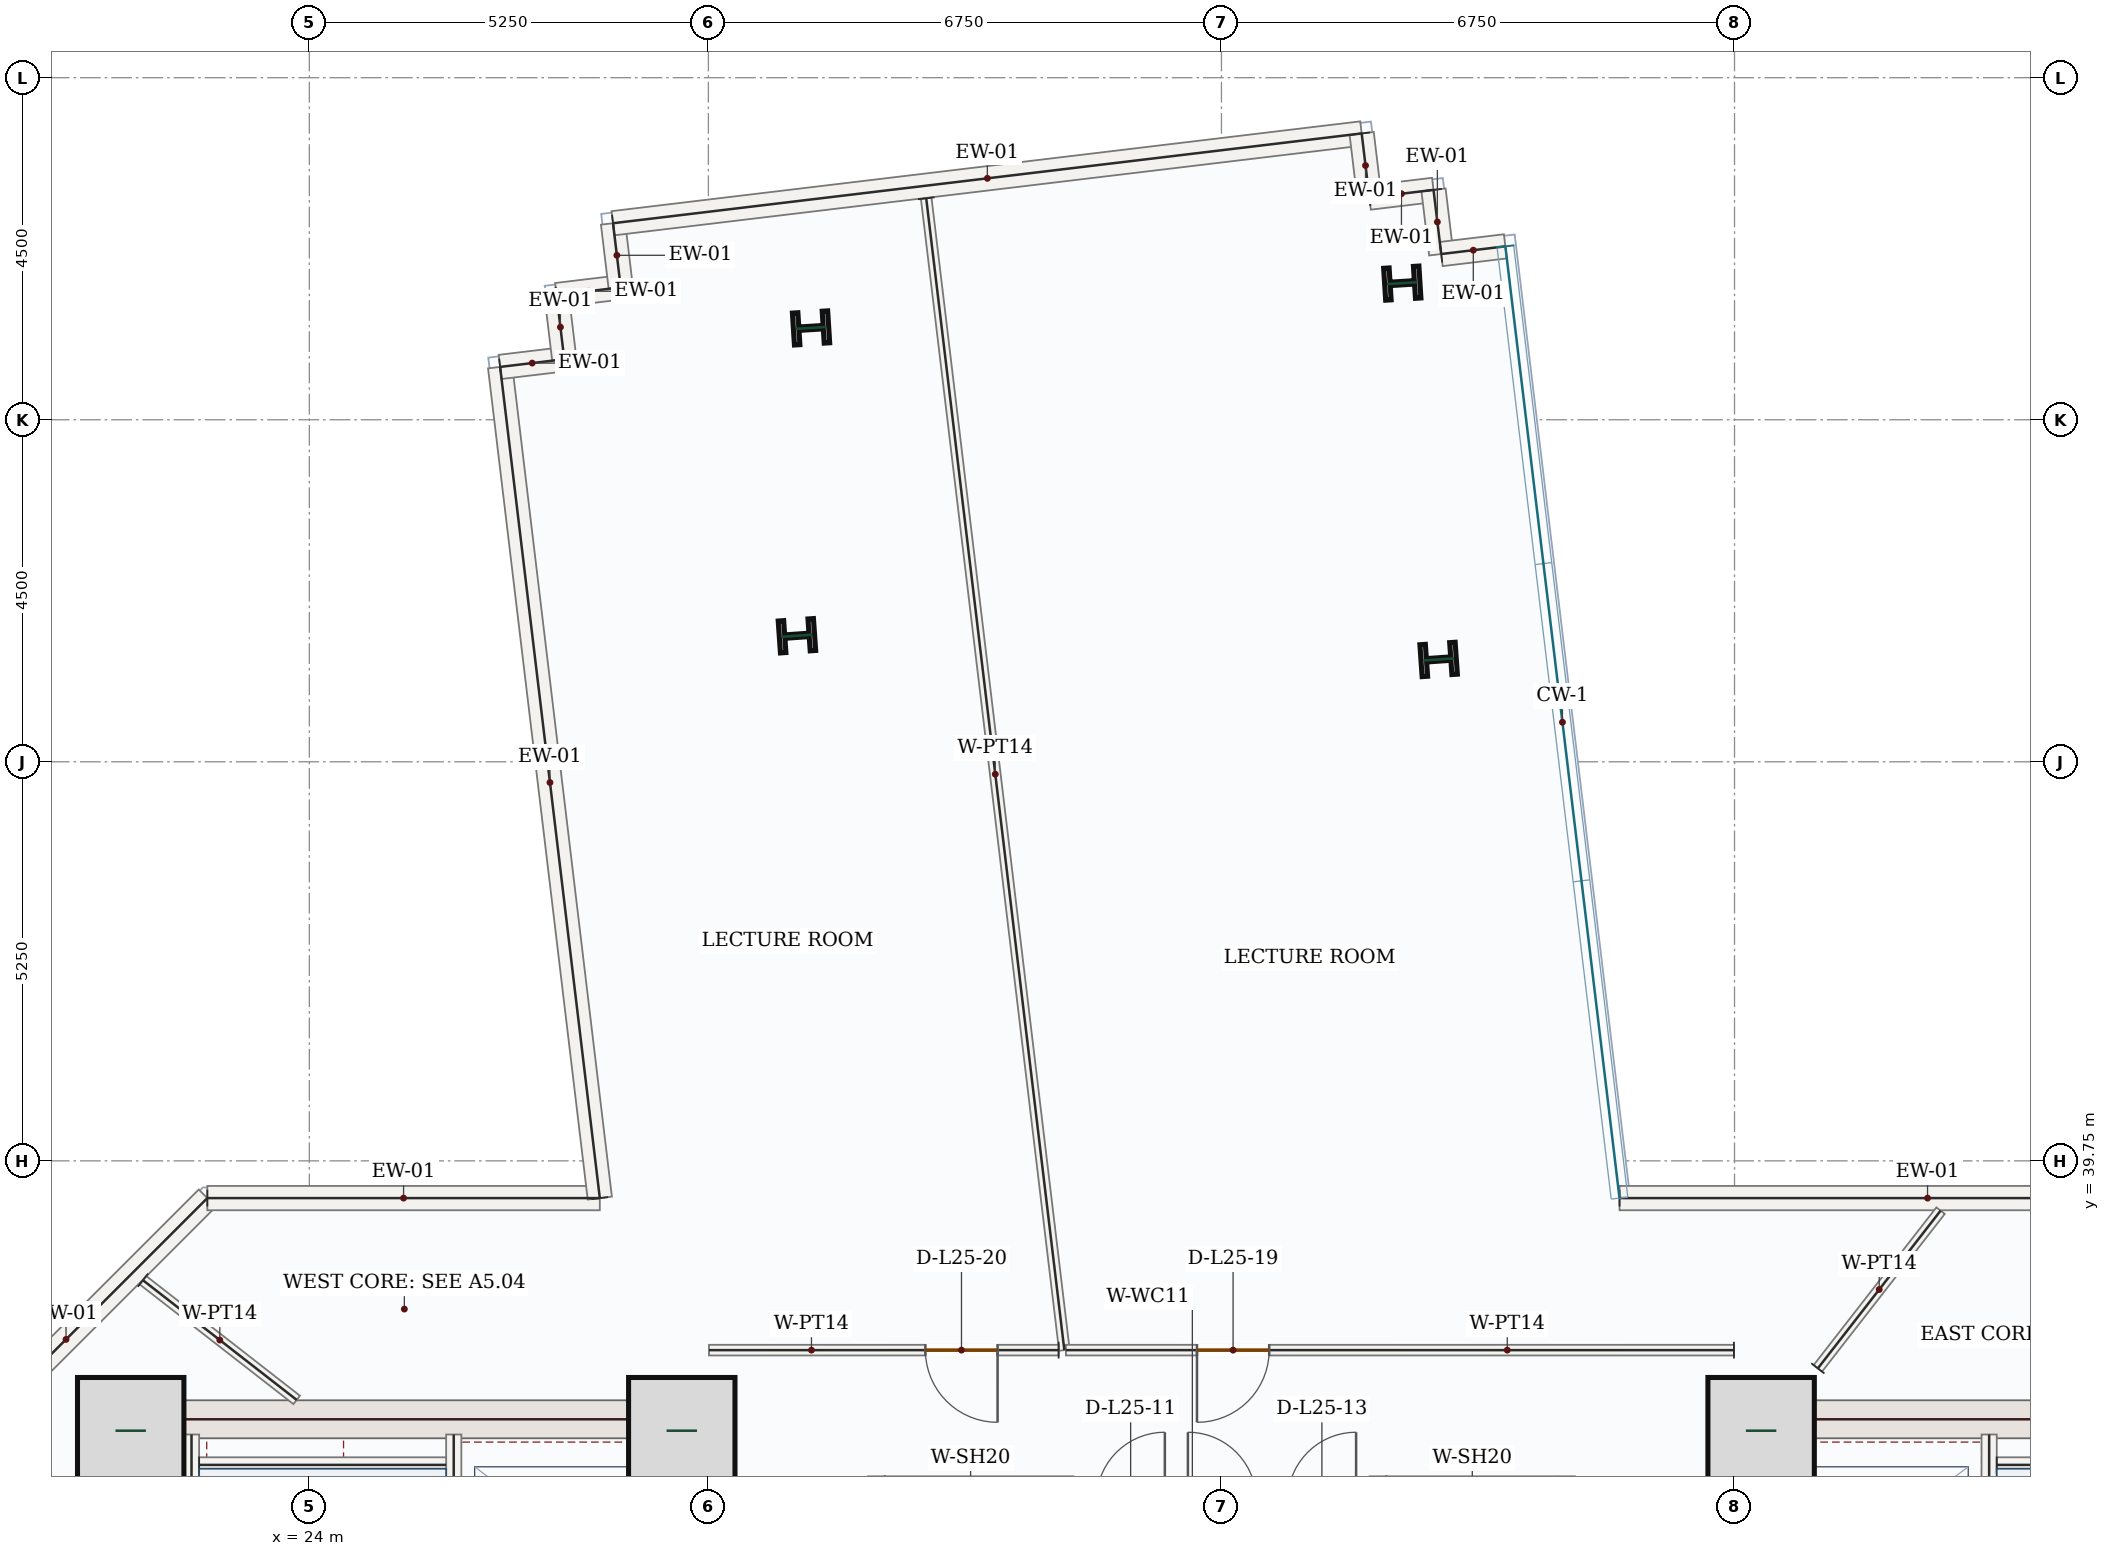
"""IFC4 building model, lengths in metres.
Left out: names, types, materials, properties, quantities, classifications, styles, units other than length and angle.
Written with IfcOpenShell. Run it as: python <this file> out.ifc"""

import sys

from ifc_helpers import new_model, si_unit, direction, frame, frame_2d, origin, origin_2d, place, context, subcontext, project, spatial, rectangle, i_section, extrude, source, transform, mapped, element, fill, save


model = new_model("IFC4")
c1 = context("Model", 3, precision=1e-05, world=origin(), true_north=direction((0.0, 1.0)))
c2 = subcontext(c1, "Body", "Model", "MODEL_VIEW")
j1 = project(units=[si_unit("LENGTHUNIT", "METRE"), si_unit("PLANEANGLEUNIT", "RADIAN")], contexts=[c1])
p1 = place(None, origin())
s1 = spatial("IfcSite", under=j1, at=p1, CompositionType="ELEMENT")
p2 = place(p1, origin())
s2 = spatial("IfcBuilding", under=s1, at=p2, CompositionType="ELEMENT")
p3 = place(p2, frame((0.0, 0.0, 113.1)))
s3 = spatial("IfcBuildingStorey", under=s2, at=p3, CompositionType="ELEMENT", Elevation=113.1)
m1 = source(origin(), c2, "Body", "SweptSolid", [
    extrude(rectangle(XDim=8.55, YDim=0.5, at=frame_2d((4.275, 0.0))), origin(), (0.0, 0.0, 1.0), 3.95),
])
p4 = place(p3, frame((21.5, 28.05, 0.0), z_axis=(0.0, 0.0, 1.0), x_axis=(0.0, 1.0, 0.0)))
e1 = element("IfcWall", 1, at=p4, inside=s3, PredefinedType="SHEAR", context=c2, shape_type="MappedRepresentation", body=[
    mapped(m1, transform((0.0, 0.0, 0.0), x_axis=(1.0, 0.0, 0.0), y_axis=(0.0, 1.0, 0.0), z_axis=(0.0, 0.0, 1.0), scale=1.0)),
])
p5 = place(p3, frame((29.0, 28.05, 0.0), z_axis=(0.0, 0.0, 1.0), x_axis=(0.0, 1.0, 0.0)))
e2 = element("IfcWall", 2, at=p5, inside=s3, PredefinedType="SHEAR", context=c2, shape_type="SweptSolid", body=[
    extrude(rectangle(XDim=8.55, YDim=0.5, at=frame_2d((4.275, 0.0))), origin(), (0.0, 0.0, 1.0), 3.95),
])
p6 = place(p5, frame((1.5, 0.0, 0.0)))
e3 = element("IfcOpeningElement", 3, at=p6, cuts=e2, PredefinedType="OPENING", context=c2, shape_type="SweptSolid", body=[
    extrude(rectangle(XDim=1.1, YDim=2.2, at=frame_2d((0.55, 1.1))), frame((0.0, 0.26, 0.0), z_axis=(0.0, -1.0, 0.0), x_axis=(1.0, 0.0, 0.0)), (0.0, 0.0, 1.0), 0.52),
])
m2 = source(origin(), c2, "Body", "SweptSolid", [
    extrude(rectangle(XDim=7.0, YDim=0.5, at=frame_2d((3.5, 0.0))), origin(), (0.0, 0.0, 1.0), 3.95),
])
p7 = place(p3, frame((21.75, 36.35, 0.0), z_axis=(0.0, 0.0, 1.0), x_axis=(1.0, 0.0, 0.0)))
e4 = element("IfcWall", 4, at=p7, inside=s3, PredefinedType="SHEAR", context=c2, shape_type="MappedRepresentation", body=[
    mapped(m2, transform((0.0, 0.0, 0.0), x_axis=(1.0, 0.0, 0.0), y_axis=(0.0, 1.0, 0.0), z_axis=(0.0, 0.0, 1.0), scale=1.0)),
])
p8 = place(p3, frame((43.0, 28.05, 0.0), z_axis=(0.0, 0.0, 1.0), x_axis=(0.0, 1.0, 0.0)))
e5 = element("IfcWall", 5, at=p8, inside=s3, PredefinedType="SHEAR", context=c2, shape_type="SweptSolid", body=[
    extrude(rectangle(XDim=8.55, YDim=0.5, at=frame_2d((4.275, 0.0))), origin(), (0.0, 0.0, 1.0), 3.95),
])
p9 = place(p8, frame((1.5, 0.0, 0.0)))
e6 = element("IfcOpeningElement", 6, at=p9, cuts=e5, PredefinedType="OPENING", context=c2, shape_type="SweptSolid", body=[
    extrude(rectangle(XDim=1.1, YDim=2.2, at=frame_2d((0.55, 1.1))), frame((0.0, 0.26, 0.0), z_axis=(0.0, -1.0, 0.0), x_axis=(1.0, 0.0, 0.0)), (0.0, 0.0, 1.0), 0.52),
])
p10 = place(p3, frame((43.25, 36.35, 0.0), z_axis=(0.0, 0.0, 1.0), x_axis=(1.0, 0.0, 0.0)))
e7 = element("IfcWall", 7, at=p10, inside=s3, PredefinedType="SHEAR", context=c2, shape_type="MappedRepresentation", body=[
    mapped(m2, transform((0.0, 0.0, 0.0), x_axis=(1.0, 0.0, 0.0), y_axis=(0.0, 1.0, 0.0), z_axis=(0.0, 0.0, 1.0), scale=1.0)),
])
m3 = source(origin(), c2, "Body", "SweptSolid", [
    extrude(rectangle(XDim=1.4, YDim=1.4, at=origin_2d()), origin(), (0.0, 0.0, 1.0), 4.2),
])
for number, where, z_axis, x_axis in (
    (8, (21.65, 36.2, 0.0), (0.0, 0.0, 1.0), (1.0, 0.0, 0.0)),
    (9, (28.9, 36.2, 0.0), (0.0, 0.0, 1.0), (1.0, 0.0, 0.0)),
    (10, (43.1, 36.2, 0.0), (0.0, 0.0, 1.0), (1.0, 0.0, 0.0)),
):
    element("IfcColumn", number, at=place(p3, frame(where, z_axis=z_axis, x_axis=x_axis)), inside=s3, PredefinedType="COLUMN", context=c2, shape_type="MappedRepresentation", body=[
        mapped(m3, transform((0.0, 0.0, 0.0), x_axis=(1.0, 0.0, 0.0), y_axis=(0.0, 1.0, 0.0), z_axis=(0.0, 0.0, 1.0), scale=1.0)),
    ])
m4 = source(origin(), c2, "Body", "SweptSolid", [
    extrude(i_section(OverallWidth=0.421, OverallDepth=0.465, WebThickness=0.045, FlangeThickness=0.073, FilletRadius=0.018, at=origin_2d()), origin(), (0.0, 0.0, 1.0), 4.2),
])
for number, where, z_axis, x_axis in (
    (11, (38.857, 46.346, 0.0), (0.0, 0.0, 1.0), (-0.07, 0.998, 0.0)),
    (12, (30.415, 46.658, 0.0), (0.0, 0.0, 1.0), (-0.07, 0.998, 0.0)),
    (13, (38.379, 51.297, 0.0), (0.0, 0.0, 1.0), (-0.063, 0.998, 0.0)),
    (14, (30.601, 50.708, 0.0), (0.0, 0.0, 1.0), (-0.063, 0.998, 0.0)),
):
    element("IfcColumn", number, at=place(p3, frame(where, z_axis=z_axis, x_axis=x_axis)), inside=s3, PredefinedType="COLUMN", context=c2, shape_type="MappedRepresentation", body=[
        mapped(m4, transform((0.0, 0.0, 0.0), x_axis=(1.0, 0.0, 0.0), y_axis=(0.0, 1.0, 0.0), z_axis=(0.0, 0.0, 1.0), scale=1.0)),
    ])
m5 = source(origin(), c2, "Body", "SweptSolid", [
    extrude(rectangle(XDim=5.258, YDim=0.32, at=frame_2d((2.629, 0.0))), origin(), (0.0, 0.0, 1.0), 3.95),
])
p11 = place(p3, frame((18.94, 35.542, 0.0), z_axis=(0.0, 0.0, 1.0), x_axis=(0.707106781187, 0.707106781187, 0.0)))
e15 = element("IfcWall", 15, at=p11, inside=s3, PredefinedType="SOLIDWALL", context=c2, shape_type="MappedRepresentation", body=[
    mapped(m5, transform((0.0, 0.0, 0.0), x_axis=(1.0, 0.0, 0.0), y_axis=(0.0, 1.0, 0.0), z_axis=(0.0, 0.0, 1.0), scale=1.0)),
])
m6 = source(origin(), c2, "Body", "SweptSolid", [
    extrude(rectangle(XDim=5.164, YDim=0.32, at=frame_2d((2.582, 0.0))), origin(), (0.0, 0.0, 1.0), 3.95),
])
p12 = place(p3, frame((22.658, 39.26, 0.0), z_axis=(0.0, 0.0, 1.0), x_axis=(1.0, 0.0, 0.0)))
e16 = element("IfcWall", 16, at=p12, inside=s3, PredefinedType="SOLIDWALL", context=c2, shape_type="MappedRepresentation", body=[
    mapped(m6, transform((0.0, 0.0, 0.0), x_axis=(1.0, 0.0, 0.0), y_axis=(0.0, 1.0, 0.0), z_axis=(0.0, 0.0, 1.0), scale=1.0)),
])
m7 = source(origin(), c2, "Body", "SweptSolid", [
    extrude(rectangle(XDim=11.013, YDim=0.32, at=frame_2d((5.507, 0.0))), origin(), (0.0, 0.0, 1.0), 3.95),
])
p13 = place(p3, frame((27.822, 39.26, 0.0), z_axis=(0.0, 0.0, 1.0), x_axis=(-0.119086653457, 0.992883864794, 0.0)))
e17 = element("IfcWall", 17, at=p13, inside=s3, PredefinedType="SOLIDWALL", context=c2, shape_type="MappedRepresentation", body=[
    mapped(m7, transform((0.0, 0.0, 0.0), x_axis=(1.0, 0.0, 0.0), y_axis=(0.0, 1.0, 0.0), z_axis=(0.0, 0.0, 1.0), scale=1.0)),
])
m8 = source(origin(), c2, "Body", "SweptSolid", [
    extrude(rectangle(XDim=0.85, YDim=0.32, at=frame_2d((0.425, 0.0))), origin(), (0.0, 0.0, 1.0), 3.95),
])
for number, where, z_axis, x_axis in (
    (18, (26.51, 50.195, 0.0), (0.0, 0.0, 1.0), (0.993, 0.119, 0.0)),
    (19, (27.354, 50.296, 0.0), (0.0, 0.0, 1.0), (-0.119, 0.993, 0.0)),
    (20, (27.253, 51.14, 0.0), (0.0, 0.0, 1.0), (0.993, 0.119, 0.0)),
    (21, (28.097, 51.241, 0.0), (0.0, 0.0, 1.0), (-0.119, 0.993, 0.0)),
):
    element("IfcWall", number, at=place(p3, frame(where, z_axis=z_axis, x_axis=x_axis)), inside=s3, PredefinedType="SOLIDWALL", context=c2, shape_type="MappedRepresentation", body=[
        mapped(m8, transform((0.0, 0.0, 0.0), x_axis=(1.0, 0.0, 0.0), y_axis=(0.0, 1.0, 0.0), z_axis=(0.0, 0.0, 1.0), scale=1.0)),
    ])
m9 = source(origin(), c2, "Body", "SweptSolid", [
    extrude(rectangle(XDim=9.92, YDim=0.32, at=frame_2d((4.96, 0.0))), origin(), (0.0, 0.0, 1.0), 3.95),
])
p14 = place(p3, frame((27.996, 52.085, 0.0), z_axis=(0.0, 0.0, 1.0), x_axis=(0.992883125729, 0.119092815244, 0.0)))
e22 = element("IfcWall", 22, at=p14, inside=s3, PredefinedType="SOLIDWALL", context=c2, shape_type="MappedRepresentation", body=[
    mapped(m9, transform((0.0, 0.0, 0.0), x_axis=(1.0, 0.0, 0.0), y_axis=(0.0, 1.0, 0.0), z_axis=(0.0, 0.0, 1.0), scale=1.0)),
])
for number, where, z_axis, x_axis in (
    (23, (37.845, 53.267, 0.0), (0.0, 0.0, 1.0), (0.119, -0.993, 0.0)),
    (24, (37.946, 52.423, 0.0), (0.0, 0.0, 1.0), (0.993, 0.119, 0.0)),
    (25, (38.79, 52.524, 0.0), (0.0, 0.0, 1.0), (0.119, -0.993, 0.0)),
):
    element("IfcWall", number, at=place(p3, frame(where, z_axis=z_axis, x_axis=x_axis)), inside=s3, PredefinedType="SOLIDWALL", context=c2, shape_type="MappedRepresentation", body=[
        mapped(m8, transform((0.0, 0.0, 0.0), x_axis=(1.0, 0.0, 0.0), y_axis=(0.0, 1.0, 0.0), z_axis=(0.0, 0.0, 1.0), scale=1.0)),
    ])
m10 = source(origin(), c2, "Body", "SweptSolid", [
    extrude(rectangle(XDim=0.85, YDim=0.32, at=frame_2d((0.425, 0.0))), origin(), (0.0, 0.0, 1.0), 3.95),
])
p15 = place(p3, frame((38.891, 51.68, 0.0), z_axis=(0.0, 0.0, 1.0), x_axis=(0.992867319472, 0.119224518976, 0.0)))
e26 = element("IfcWall", 26, at=p15, inside=s3, PredefinedType="SOLIDWALL", context=c2, shape_type="MappedRepresentation", body=[
    mapped(m10, transform((0.0, 0.0, 0.0), x_axis=(1.0, 0.0, 0.0), y_axis=(0.0, 1.0, 0.0), z_axis=(0.0, 0.0, 1.0), scale=1.0)),
])
m11 = source(origin(), c2, "Body", "SweptSolid", [
    extrude(rectangle(XDim=8.105, YDim=0.32, at=frame_2d((4.052, 0.0))), origin(), (0.0, 0.0, 1.0), 3.95),
])
p16 = place(p3, frame((41.237, 39.26, 0.0), z_axis=(0.0, 0.0, 1.0), x_axis=(1.0, 0.0, 0.0)))
e27 = element("IfcWall", 27, at=p16, inside=s3, PredefinedType="SOLIDWALL", context=c2, shape_type="MappedRepresentation", body=[
    mapped(m11, transform((0.0, 0.0, 0.0), x_axis=(1.0, 0.0, 0.0), y_axis=(0.0, 1.0, 0.0), z_axis=(0.0, 0.0, 1.0), scale=1.0)),
])
m12 = source(origin(), c2, "Body", "SweptSolid", [
    extrude(rectangle(XDim=7.87, YDim=0.2, at=frame_2d((3.935, 0.0))), origin(), (0.0, 0.0, 1.0), 3.95),
])
p17 = place(p3, frame((22.45, 28.28, 0.0), z_axis=(0.0, 0.0, 1.0), x_axis=(0.0, 1.0, 0.0)))
e28 = element("IfcWall", 28, at=p17, inside=s3, PredefinedType="SOLIDWALL", context=c2, shape_type="MappedRepresentation", body=[
    mapped(m12, transform((0.0, 0.0, 0.0), x_axis=(1.0, 0.0, 0.0), y_axis=(0.0, 1.0, 0.0), z_axis=(0.0, 0.0, 1.0), scale=1.0)),
])
p18 = place(p3, frame((25.9, 28.15, 0.0), z_axis=(0.0, 0.0, 1.0), x_axis=(0.0, 1.0, 0.0)))
e29 = element("IfcWall", 29, at=p18, inside=s3, PredefinedType="SOLIDWALL", context=c2, shape_type="SweptSolid", body=[
    extrude(rectangle(XDim=8.0, YDim=0.2, at=frame_2d((4.0, 0.0))), origin(), (0.0, 0.0, 1.0), 3.95),
])
p19 = place(p18, frame((0.4, 0.0, 0.0)))
e30 = element("IfcOpeningElement", 30, at=p19, cuts=e29, PredefinedType="OPENING", context=c2, shape_type="SweptSolid", body=[
    extrude(rectangle(XDim=1.05, YDim=2.15, at=frame_2d((0.525, 1.075))), frame((0.0, 0.11, 0.0), z_axis=(0.0, -1.0, 0.0), x_axis=(1.0, 0.0, 0.0)), (0.0, 0.0, 1.0), 0.22),
])
p20 = place(p3, frame((46.1, 28.15, 0.0), z_axis=(0.0, 0.0, 1.0), x_axis=(0.0, 1.0, 0.0)))
e31 = element("IfcWall", 31, at=p20, inside=s3, PredefinedType="SOLIDWALL", context=c2, shape_type="SweptSolid", body=[
    extrude(rectangle(XDim=8.0, YDim=0.2, at=frame_2d((4.0, 0.0))), origin(), (0.0, 0.0, 1.0), 3.95),
])
p21 = place(p20, frame((0.4, 0.0, 0.0)))
e32 = element("IfcOpeningElement", 32, at=p21, cuts=e31, PredefinedType="OPENING", context=c2, shape_type="SweptSolid", body=[
    extrude(rectangle(XDim=1.05, YDim=2.15, at=frame_2d((0.525, 1.075))), frame((0.0, 0.11, 0.0), z_axis=(0.0, -1.0, 0.0), x_axis=(1.0, 0.0, 0.0)), (0.0, 0.0, 1.0), 0.22),
])
m13 = source(origin(), c2, "Body", "SweptSolid", [
    extrude(rectangle(XDim=3.25, YDim=0.2, at=frame_2d((1.625, 0.0))), origin(), (0.0, 0.0, 1.0), 3.95),
])
for number, where, z_axis, x_axis in (
    (33, (22.55, 35.75, 0.0), (0.0, 0.0, 1.0), (1.0, 0.0, 0.0)),
    (34, (46.2, 35.75, 0.0), (0.0, 0.0, 1.0), (1.0, 0.0, 0.0)),
):
    element("IfcWall", number, at=place(p3, frame(where, z_axis=z_axis, x_axis=x_axis)), inside=s3, PredefinedType="SOLIDWALL", context=c2, shape_type="MappedRepresentation", body=[
        mapped(m13, transform((0.0, 0.0, 0.0), x_axis=(1.0, 0.0, 0.0), y_axis=(0.0, 1.0, 0.0), z_axis=(0.0, 0.0, 1.0), scale=1.0)),
    ])
m14 = source(origin(), c2, "Body", "SweptSolid", [
    extrude(rectangle(XDim=2.4, YDim=0.2, at=frame_2d((1.2, 0.0))), origin(), (0.0, 0.0, 1.0), 3.95),
])
for number, where, z_axis, x_axis in (
    (35, (31.45, 33.2, 0.0), (0.0, 0.0, 1.0), (0.0, 1.0, 0.0)),
    (36, (33.95, 33.2, 0.0), (0.0, 0.0, 1.0), (0.0, 1.0, 0.0)),
    (37, (38.05, 33.2, 0.0), (0.0, 0.0, 1.0), (0.0, 1.0, 0.0)),
    (38, (40.55, 33.2, 0.0), (0.0, 0.0, 1.0), (0.0, 1.0, 0.0)),
):
    element("IfcWall", number, at=place(p3, frame(where, z_axis=z_axis, x_axis=x_axis)), inside=s3, PredefinedType="SOLIDWALL", context=c2, shape_type="MappedRepresentation", body=[
        mapped(m14, transform((0.0, 0.0, 0.0), x_axis=(1.0, 0.0, 0.0), y_axis=(0.0, 1.0, 0.0), z_axis=(0.0, 0.0, 1.0), scale=1.0)),
    ])
m15 = source(origin(), c2, "Body", "SweptSolid", [
    extrude(rectangle(XDim=2.563, YDim=0.14, at=frame_2d((1.282, 0.0))), origin(), (0.0, 0.0, 1.0), 3.95),
])
p22 = place(p3, frame((21.811, 38.18, 0.0), z_axis=(0.0, 0.0, 1.0), x_axis=(0.789034129839, -0.614349364734, 0.0)))
e39 = element("IfcWall", 39, at=p22, inside=s3, PredefinedType="PARTITIONING", context=c2, shape_type="MappedRepresentation", body=[
    mapped(m15, transform((0.0, 0.0, 0.0), x_axis=(1.0, 0.0, 0.0), y_axis=(0.0, 1.0, 0.0), z_axis=(0.0, 0.0, 1.0), scale=1.0)),
])
m16 = source(origin(), c2, "Body", "SweptSolid", [
    extrude(rectangle(XDim=2.629, YDim=0.14, at=frame_2d((1.315, 0.0))), origin(), (0.0, 0.0, 1.0), 3.95),
])
p23 = place(p3, frame((43.846, 37.02, 0.0), z_axis=(0.0, 0.0, 1.0), x_axis=(0.614210560268, 0.789142184689, 0.0)))
e40 = element("IfcWall", 40, at=p23, inside=s3, PredefinedType="PARTITIONING", context=c2, shape_type="MappedRepresentation", body=[
    mapped(m16, transform((0.0, 0.0, 0.0), x_axis=(1.0, 0.0, 0.0), y_axis=(0.0, 1.0, 0.0), z_axis=(0.0, 0.0, 1.0), scale=1.0)),
])
m17 = source(origin(), c2, "Body", "SweptSolid", [
    extrude(rectangle(XDim=15.262, YDim=0.14, at=frame_2d((7.631, 0.0))), origin(), (0.0, 0.0, 1.0), 3.95),
])
p24 = place(p3, frame((32.116, 52.413, 0.0), z_axis=(0.0, 0.0, 1.0), x_axis=(0.119095388495, -0.992882817073, 0.0)))
e41 = element("IfcWall", 41, at=p24, inside=s3, PredefinedType="PARTITIONING", context=c2, shape_type="MappedRepresentation", body=[
    mapped(m17, transform((0.0, 0.0, 0.0), x_axis=(1.0, 0.0, 0.0), y_axis=(0.0, 1.0, 0.0), z_axis=(0.0, 0.0, 1.0), scale=1.0)),
])
p25 = place(p3, frame((33.858, 37.26, 0.0), z_axis=(0.0, 0.0, 1.0), x_axis=(-0.999999998592, -5.3070106e-05, 0.0)))
e42 = element("IfcWall", 42, at=p25, inside=s3, PredefinedType="PARTITIONING", context=c2, shape_type="SweptSolid", body=[
    extrude(rectangle(XDim=4.6, YDim=0.14, at=frame_2d((2.3, 0.0))), origin(), (0.0, 0.0, 1.0), 3.95),
])
p26 = place(p25, frame((0.803, 0.0, 0.0)))
e43 = element("IfcOpeningElement", 43, at=p26, cuts=e42, PredefinedType="OPENING", context=c2, shape_type="SweptSolid", body=[
    extrude(rectangle(XDim=0.95, YDim=2.15, at=frame_2d((0.475, 1.075))), frame((0.0, 0.08, 0.0), z_axis=(0.0, -1.0, 0.0), x_axis=(1.0, 0.0, 0.0)), (0.0, 0.0, 1.0), 0.16),
])
p27 = place(p3, frame((42.742, 37.26, 0.0), z_axis=(0.0, 0.0, 1.0), x_axis=(-0.999999999614, 2.7778549e-05, 0.0)))
e44 = element("IfcWall", 44, at=p27, inside=s3, PredefinedType="PARTITIONING", context=c2, shape_type="SweptSolid", body=[
    extrude(rectangle(XDim=8.789, YDim=0.14, at=frame_2d((4.395, 0.0))), origin(), (0.0, 0.0, 1.0), 3.95),
])
p28 = place(p27, frame((6.114, 0.0, 0.0)))
e45 = element("IfcOpeningElement", 45, at=p28, cuts=e44, PredefinedType="OPENING", context=c2, shape_type="SweptSolid", body=[
    extrude(rectangle(XDim=0.95, YDim=2.15, at=frame_2d((0.475, 1.075))), frame((0.0, 0.08, 0.0), z_axis=(0.0, -1.0, 0.0), x_axis=(1.0, 0.0, 0.0)), (0.0, 0.0, 1.0), 0.16),
])
m18 = source(origin(), c2, "Body", "SweptSolid", [
    extrude(rectangle(XDim=0.95, YDim=2.15, at=frame_2d((0.475, 1.075))), frame((0.0, 0.025, 0.0), z_axis=(0.0, -1.0, 0.0), x_axis=(1.0, 0.0, 0.0)), (0.0, 0.0, 1.0), 0.05),
])
p29 = place(p28, origin())
e46 = element("IfcDoor", 46, at=p29, inside=s3, OperationType="SINGLE_SWING_RIGHT", PredefinedType="DOOR", context=c2, shape_type="MappedRepresentation", body=[
    mapped(m18, transform((0.0, 0.0, 0.0), x_axis=(1.0, 0.0, 0.0), y_axis=(0.0, 1.0, 0.0), z_axis=(0.0, 0.0, 1.0), scale=1.0)),
])
fill(e45, e46)
p30 = place(p26, origin())
e47 = element("IfcDoor", 47, at=p30, inside=s3, OperationType="SINGLE_SWING_LEFT", PredefinedType="DOOR", context=c2, shape_type="MappedRepresentation", body=[
    mapped(m18, transform((0.0, 0.0, 0.0), x_axis=(1.0, 0.0, 0.0), y_axis=(0.0, 1.0, 0.0), z_axis=(0.0, 0.0, 1.0), scale=1.0)),
])
fill(e43, e47)
save(model, sys.argv[1])
